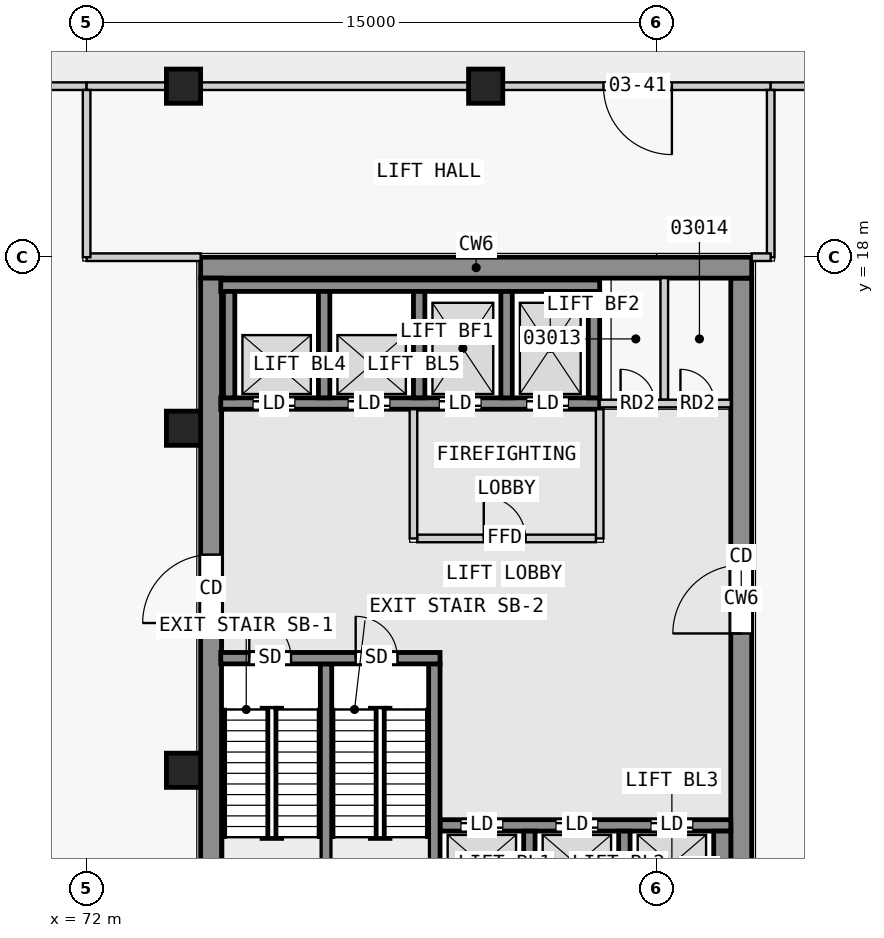
"""IFC4 building model, lengths in metres.
Left out: names, types, materials, properties, quantities, classifications, styles, units other than length and angle.
Written with IfcOpenShell. Run it as: python <this file> out.ifc"""

import sys

from ifc_helpers import new_model, si_unit, direction, frame, frame_2d, origin, origin_2d, place, context, subcontext, project, spatial, rectangle, extrude, element, fill, save


model = new_model("IFC4")
c1 = context("Model", 3, precision=1e-05, world=origin(), true_north=direction((0.0, 1.0)))
c2 = subcontext(c1, "Body", "Model", "MODEL_VIEW")
j1 = project(units=[si_unit("LENGTHUNIT", "METRE"), si_unit("PLANEANGLEUNIT", "RADIAN")], contexts=[c1])
p1 = place(None, origin())
s1 = spatial("IfcSite", under=j1, at=p1, CompositionType="ELEMENT")
p2 = place(p1, origin())
s2 = spatial("IfcBuilding", under=s1, at=p2, CompositionType="ELEMENT")
p3 = place(p2, frame((0.0, 0.0, 17.3)))
s3 = spatial("IfcBuildingStorey", under=s2, at=p3, CompositionType="ELEMENT", Elevation=17.3)
for number, where, z_axis, x_axis in (
    (1, (82.5, 22.5, 0.0), (0.0, 0.0, 1.0), (1.0, 0.0, 0.0)),
    (2, (74.55, 22.5, 0.0), (0.0, 0.0, 1.0), (1.0, 0.0, 0.0)),
    (3, (74.55, 13.5, 0.0), (0.0, 0.0, 1.0), (1.0, 0.0, 0.0)),
    (4, (74.55, 4.5, 0.0), (0.0, 0.0, 1.0), (1.0, 0.0, 0.0)),
):
    element("IfcColumn", number, at=place(p3, frame(where, z_axis=z_axis, x_axis=x_axis)), inside=s3, PredefinedType="COLUMN", context=c2, shape_type="SweptSolid", body=[
        extrude(rectangle(XDim=0.9, YDim=0.9, at=origin_2d()), origin(), (0.0, 0.0, 1.0), 4.5),
    ])
p4 = place(p3, frame((75.0, 17.725, 0.0), z_axis=(0.0, 0.0, 1.0), x_axis=(1.0, 0.0, 0.0)))
e5 = element("IfcWall", 5, at=p4, inside=s3, PredefinedType="SHEAR", context=c2, shape_type="SweptSolid", body=[
    extrude(rectangle(XDim=14.5, YDim=0.55, at=frame_2d((7.25, 0.0))), origin(), (0.0, 0.0, 1.0), 4.15),
])
p5 = place(p3, frame((75.275, 0.55, 0.0), z_axis=(0.0, 0.0, 1.0), x_axis=(0.0, 1.0, 0.0)))
e6 = element("IfcWall", 6, at=p5, inside=s3, PredefinedType="SHEAR", context=c2, shape_type="SweptSolid", body=[
    extrude(rectangle(XDim=16.9, YDim=0.55, at=frame_2d((8.45, 0.0))), origin(), (0.0, 0.0, 1.0), 4.15),
])
p6 = place(p5, frame((7.825, 0.0, 0.0)))
e7 = element("IfcOpeningElement", 7, at=p6, cuts=e6, PredefinedType="OPENING", context=c2, shape_type="SweptSolid", body=[
    extrude(rectangle(XDim=1.8, YDim=2.1, at=frame_2d((0.9, 1.05))), frame((0.0, 0.285, 0.0), z_axis=(0.0, -1.0, 0.0), x_axis=(1.0, 0.0, 0.0)), (0.0, 0.0, 1.0), 0.57),
])
p7 = place(p3, frame((89.225, 0.55, 0.0), z_axis=(0.0, 0.0, 1.0), x_axis=(0.0, 1.0, 0.0)))
e8 = element("IfcWall", 8, at=p7, inside=s3, PredefinedType="SHEAR", context=c2, shape_type="SweptSolid", body=[
    extrude(rectangle(XDim=16.9, YDim=0.55, at=frame_2d((8.45, 0.0))), origin(), (0.0, 0.0, 1.0), 4.15),
])
p8 = place(p7, frame((7.55, 0.0, 0.0)))
e9 = element("IfcOpeningElement", 9, at=p8, cuts=e8, PredefinedType="OPENING", context=c2, shape_type="SweptSolid", body=[
    extrude(rectangle(XDim=1.8, YDim=2.1, at=frame_2d((0.9, 1.05))), frame((0.0, 0.285, 0.0), z_axis=(0.0, -1.0, 0.0), x_axis=(1.0, 0.0, 0.0)), (0.0, 0.0, 1.0), 0.57),
])
p9 = place(p3, frame((75.53, 7.45, 0.0), z_axis=(0.0, 0.0, 1.0), x_axis=(1.0, 0.0, 0.0)))
e10 = element("IfcWall", 10, at=p9, inside=s3, PredefinedType="SHEAR", context=c2, shape_type="SweptSolid", body=[
    extrude(rectangle(XDim=5.77, YDim=0.3, at=frame_2d((2.885, 0.0))), origin(), (0.0, 0.0, 1.0), 4.15),
])
p10 = place(p9, frame((0.75, 0.0, 0.0)))
e11 = element("IfcOpeningElement", 11, at=p10, cuts=e10, PredefinedType="OPENING", context=c2, shape_type="SweptSolid", body=[
    extrude(rectangle(XDim=1.1, YDim=2.1, at=frame_2d((0.55, 1.05))), frame((0.0, 0.16, 0.0), z_axis=(0.0, -1.0, 0.0), x_axis=(1.0, 0.0, 0.0)), (0.0, 0.0, 1.0), 0.32),
])
p11 = place(p9, frame((3.55, 0.0, 0.0)))
e12 = element("IfcOpeningElement", 12, at=p11, cuts=e10, PredefinedType="OPENING", context=c2, shape_type="SweptSolid", body=[
    extrude(rectangle(XDim=1.1, YDim=2.1, at=frame_2d((0.55, 1.05))), frame((0.0, 0.16, 0.0), z_axis=(0.0, -1.0, 0.0), x_axis=(1.0, 0.0, 0.0)), (0.0, 0.0, 1.0), 0.32),
])
for number, where, z_axis, x_axis in (
    (13, (78.3, 0.9, 0.0), (0.0, 0.0, 1.0), (0.0, 1.0, 0.0)),
    (14, (81.15, 0.9, 0.0), (0.0, 0.0, 1.0), (0.0, 1.0, 0.0)),
):
    element("IfcWall", number, at=place(p3, frame(where, z_axis=z_axis, x_axis=x_axis)), inside=s3, PredefinedType="SHEAR", context=c2, shape_type="SweptSolid", body=[
        extrude(rectangle(XDim=6.4, YDim=0.3, at=frame_2d((3.2, 0.0))), origin(), (0.0, 0.0, 1.0), 4.15),
    ])
for number, where, z_axis, x_axis in (
    (15, (83.65, 0.9, 0.0), (0.0, 0.0, 1.0), (0.0, 1.0, 0.0)),
    (16, (86.15, 0.9, 0.0), (0.0, 0.0, 1.0), (0.0, 1.0, 0.0)),
):
    element("IfcWall", number, at=place(p3, frame(where, z_axis=z_axis, x_axis=x_axis)), inside=s3, PredefinedType="SHEAR", context=c2, shape_type="SweptSolid", body=[
        extrude(rectangle(XDim=2.0, YDim=0.3, at=frame_2d((1.0, 0.0))), origin(), (0.0, 0.0, 1.0), 4.15),
    ])
p12 = place(p3, frame((88.725, 0.9, 0.0), z_axis=(0.0, 0.0, 1.0), x_axis=(0.0, 1.0, 0.0)))
e17 = element("IfcWall", 17, at=p12, inside=s3, PredefinedType="SHEAR", context=c2, shape_type="SweptSolid", body=[
    extrude(rectangle(XDim=2.0, YDim=0.45, at=frame_2d((1.0, 0.0))), origin(), (0.0, 0.0, 1.0), 4.15),
])
p13 = place(p3, frame((81.3, 3.05, 0.0), z_axis=(0.0, 0.0, 1.0), x_axis=(1.0, 0.0, 0.0)))
e18 = element("IfcWall", 18, at=p13, inside=s3, PredefinedType="SHEAR", context=c2, shape_type="SweptSolid", body=[
    extrude(rectangle(XDim=7.65, YDim=0.3, at=frame_2d((3.825, 0.0))), origin(), (0.0, 0.0, 1.0), 4.15),
])
p14 = place(p13, frame((0.55, 0.0, 0.0)))
e19 = element("IfcOpeningElement", 19, at=p14, cuts=e18, PredefinedType="OPENING", context=c2, shape_type="SweptSolid", body=[
    extrude(rectangle(XDim=1.1, YDim=2.1, at=frame_2d((0.55, 1.05))), frame((0.0, 0.16, 0.0), z_axis=(0.0, -1.0, 0.0), x_axis=(1.0, 0.0, 0.0)), (0.0, 0.0, 1.0), 0.32),
])
p15 = place(p13, frame((3.05, 0.0, 0.0)))
e20 = element("IfcOpeningElement", 20, at=p15, cuts=e18, PredefinedType="OPENING", context=c2, shape_type="SweptSolid", body=[
    extrude(rectangle(XDim=1.1, YDim=2.1, at=frame_2d((0.55, 1.05))), frame((0.0, 0.16, 0.0), z_axis=(0.0, -1.0, 0.0), x_axis=(1.0, 0.0, 0.0)), (0.0, 0.0, 1.0), 0.32),
])
p16 = place(p13, frame((5.55, 0.0, 0.0)))
e21 = element("IfcOpeningElement", 21, at=p16, cuts=e18, PredefinedType="OPENING", context=c2, shape_type="SweptSolid", body=[
    extrude(rectangle(XDim=1.1, YDim=2.1, at=frame_2d((0.55, 1.05))), frame((0.0, 0.16, 0.0), z_axis=(0.0, -1.0, 0.0), x_axis=(1.0, 0.0, 0.0)), (0.0, 0.0, 1.0), 0.32),
])
p17 = place(p3, frame((75.53, 17.25, 0.0), z_axis=(0.0, 0.0, 1.0), x_axis=(1.0, 0.0, 0.0)))
e22 = element("IfcWall", 22, at=p17, inside=s3, PredefinedType="SHEAR", context=c2, shape_type="SweptSolid", body=[
    extrude(rectangle(XDim=9.97, YDim=0.3, at=frame_2d((4.985, 0.0))), origin(), (0.0, 0.0, 1.0), 4.15),
])
p18 = place(p3, frame((75.53, 14.15, 0.0), z_axis=(0.0, 0.0, 1.0), x_axis=(1.0, 0.0, 0.0)))
e23 = element("IfcWall", 23, at=p18, inside=s3, PredefinedType="SHEAR", context=c2, shape_type="SweptSolid", body=[
    extrude(rectangle(XDim=9.97, YDim=0.3, at=frame_2d((4.985, 0.0))), origin(), (0.0, 0.0, 1.0), 4.15),
])
p19 = place(p18, frame((0.85, 0.0, 0.0)))
e24 = element("IfcOpeningElement", 24, at=p19, cuts=e23, PredefinedType="OPENING", context=c2, shape_type="SweptSolid", body=[
    extrude(rectangle(XDim=1.1, YDim=2.1, at=frame_2d((0.55, 1.05))), frame((0.0, 0.16, 0.0), z_axis=(0.0, -1.0, 0.0), x_axis=(1.0, 0.0, 0.0)), (0.0, 0.0, 1.0), 0.32),
])
p20 = place(p18, frame((3.35, 0.0, 0.0)))
e25 = element("IfcOpeningElement", 25, at=p20, cuts=e23, PredefinedType="OPENING", context=c2, shape_type="SweptSolid", body=[
    extrude(rectangle(XDim=1.1, YDim=2.1, at=frame_2d((0.55, 1.05))), frame((0.0, 0.16, 0.0), z_axis=(0.0, -1.0, 0.0), x_axis=(1.0, 0.0, 0.0)), (0.0, 0.0, 1.0), 0.32),
])
p21 = place(p18, frame((5.75, 0.0, 0.0)))
e26 = element("IfcOpeningElement", 26, at=p21, cuts=e23, PredefinedType="OPENING", context=c2, shape_type="SweptSolid", body=[
    extrude(rectangle(XDim=1.1, YDim=2.1, at=frame_2d((0.55, 1.05))), frame((0.0, 0.16, 0.0), z_axis=(0.0, -1.0, 0.0), x_axis=(1.0, 0.0, 0.0)), (0.0, 0.0, 1.0), 0.32),
])
p22 = place(p18, frame((8.05, 0.0, 0.0)))
e27 = element("IfcOpeningElement", 27, at=p22, cuts=e23, PredefinedType="OPENING", context=c2, shape_type="SweptSolid", body=[
    extrude(rectangle(XDim=1.1, YDim=2.1, at=frame_2d((0.55, 1.05))), frame((0.0, 0.16, 0.0), z_axis=(0.0, -1.0, 0.0), x_axis=(1.0, 0.0, 0.0)), (0.0, 0.0, 1.0), 0.32),
])
for number, where, z_axis, x_axis in (
    (28, (75.75, 14.3, 0.0), (0.0, 0.0, 1.0), (0.0, 1.0, 0.0)),
    (29, (78.25, 14.3, 0.0), (0.0, 0.0, 1.0), (0.0, 1.0, 0.0)),
    (30, (80.75, 14.3, 0.0), (0.0, 0.0, 1.0), (0.0, 1.0, 0.0)),
    (31, (83.05, 14.3, 0.0), (0.0, 0.0, 1.0), (0.0, 1.0, 0.0)),
    (32, (85.35, 14.3, 0.0), (0.0, 0.0, 1.0), (0.0, 1.0, 0.0)),
):
    element("IfcWall", number, at=place(p3, frame(where, z_axis=z_axis, x_axis=x_axis)), inside=s3, PredefinedType="SHEAR", context=c2, shape_type="SweptSolid", body=[
        extrude(rectangle(XDim=2.8, YDim=0.3, at=frame_2d((1.4, 0.0))), origin(), (0.0, 0.0, 1.0), 4.15),
    ])
p23 = place(p3, frame((80.6, 10.6, 0.0), z_axis=(0.0, 0.0, 1.0), x_axis=(0.0, 1.0, 0.0)))
e33 = element("IfcWall", 33, at=p23, inside=s3, PredefinedType="PARTITIONING", context=c2, shape_type="SweptSolid", body=[
    extrude(rectangle(XDim=3.4, YDim=0.2, at=frame_2d((1.7, 0.0))), origin(), (0.0, 0.0, 1.0), 4.15),
])
p24 = place(p3, frame((80.7, 10.6, 0.0), z_axis=(0.0, 0.0, 1.0), x_axis=(1.0, 0.0, 0.0)))
e34 = element("IfcWall", 34, at=p24, inside=s3, PredefinedType="PARTITIONING", context=c2, shape_type="SweptSolid", body=[
    extrude(rectangle(XDim=4.7, YDim=0.2, at=frame_2d((2.35, 0.0))), origin(), (0.0, 0.0, 1.0), 4.15),
])
p25 = place(p24, frame((1.75, 0.0, 0.0)))
e35 = element("IfcOpeningElement", 35, at=p25, cuts=e34, PredefinedType="OPENING", context=c2, shape_type="SweptSolid", body=[
    extrude(rectangle(XDim=1.1, YDim=2.1, at=frame_2d((0.55, 1.05))), frame((0.0, 0.11, 0.0), z_axis=(0.0, -1.0, 0.0), x_axis=(1.0, 0.0, 0.0)), (0.0, 0.0, 1.0), 0.22),
])
p26 = place(p3, frame((85.5, 10.6, 0.0), z_axis=(0.0, 0.0, 1.0), x_axis=(0.0, 1.0, 0.0)))
e36 = element("IfcWall", 36, at=p26, inside=s3, PredefinedType="PARTITIONING", context=c2, shape_type="SweptSolid", body=[
    extrude(rectangle(XDim=3.4, YDim=0.2, at=frame_2d((1.7, 0.0))), origin(), (0.0, 0.0, 1.0), 4.15),
])
p27 = place(p3, frame((85.5, 14.15, 0.0), z_axis=(0.0, 0.0, 1.0), x_axis=(1.0, 0.0, 0.0)))
e37 = element("IfcWall", 37, at=p27, inside=s3, PredefinedType="PARTITIONING", context=c2, shape_type="SweptSolid", body=[
    extrude(rectangle(XDim=3.45, YDim=0.2, at=frame_2d((1.725, 0.0))), origin(), (0.0, 0.0, 1.0), 4.15),
])
p28 = place(p27, frame((0.55, 0.0, 0.0)))
e38 = element("IfcOpeningElement", 38, at=p28, cuts=e37, PredefinedType="OPENING", context=c2, shape_type="SweptSolid", body=[
    extrude(rectangle(XDim=0.9, YDim=2.1, at=frame_2d((0.45, 1.05))), frame((0.0, 0.11, 0.0), z_axis=(0.0, -1.0, 0.0), x_axis=(1.0, 0.0, 0.0)), (0.0, 0.0, 1.0), 0.22),
])
p29 = place(p27, frame((2.125, 0.0, 0.0)))
e39 = element("IfcOpeningElement", 39, at=p29, cuts=e37, PredefinedType="OPENING", context=c2, shape_type="SweptSolid", body=[
    extrude(rectangle(XDim=0.9, YDim=2.1, at=frame_2d((0.45, 1.05))), frame((0.0, 0.11, 0.0), z_axis=(0.0, -1.0, 0.0), x_axis=(1.0, 0.0, 0.0)), (0.0, 0.0, 1.0), 0.22),
])
p30 = place(p3, frame((87.2, 14.25, 0.0), z_axis=(0.0, 0.0, 1.0), x_axis=(0.0, 1.0, 0.0)))
e40 = element("IfcWall", 40, at=p30, inside=s3, PredefinedType="PARTITIONING", context=c2, shape_type="SweptSolid", body=[
    extrude(rectangle(XDim=3.2, YDim=0.2, at=frame_2d((1.6, 0.0))), origin(), (0.0, 0.0, 1.0), 4.15),
])
p31 = place(p3, frame((72.0, 22.5, 0.0), z_axis=(0.0, 0.0, 1.0), x_axis=(-1.0, 0.0, 0.0)))
e41 = element("IfcWall", 41, at=p31, inside=s3, PredefinedType="PARTITIONING", context=c2, shape_type="SweptSolid", body=[
    extrude(rectangle(XDim=27.0, YDim=0.2, at=frame_2d((13.5, 0.0))), origin(), (0.0, 0.0, 1.0), 4.15),
])
p32 = place(p31, frame((12.6, 0.0, 0.0)))
e42 = element("IfcOpeningElement", 42, at=p32, cuts=e41, PredefinedType="OPENING", context=c2, shape_type="SweptSolid", body=[
    extrude(rectangle(XDim=1.8, YDim=2.1, at=frame_2d((0.9, 1.05))), frame((0.0, 0.11, 0.0), z_axis=(0.0, -1.0, 0.0), x_axis=(1.0, 0.0, 0.0)), (0.0, 0.0, 1.0), 0.22),
])
p33 = place(p3, frame((90.0, 22.5, 0.0), z_axis=(0.0, 0.0, 1.0), x_axis=(-1.0, 0.0, 0.0)))
e43 = element("IfcWall", 43, at=p33, inside=s3, PredefinedType="PARTITIONING", context=c2, shape_type="SweptSolid", body=[
    extrude(rectangle(XDim=7.05, YDim=0.2, at=frame_2d((3.525, 0.0))), origin(), (0.0, 0.0, 1.0), 4.15),
])
p34 = place(p33, frame((2.6, 0.0, 0.0)))
e44 = element("IfcOpeningElement", 44, at=p34, cuts=e43, PredefinedType="OPENING", context=c2, shape_type="SweptSolid", body=[
    extrude(rectangle(XDim=1.8, YDim=2.1, at=frame_2d((0.9, 1.05))), frame((0.0, 0.11, 0.0), z_axis=(0.0, -1.0, 0.0), x_axis=(1.0, 0.0, 0.0)), (0.0, 0.0, 1.0), 0.22),
])
p35 = place(p3, frame((82.05, 22.5, 0.0), z_axis=(0.0, 0.0, 1.0), x_axis=(-1.0, 0.0, 0.0)))
e45 = element("IfcWall", 45, at=p35, inside=s3, PredefinedType="PARTITIONING", context=c2, shape_type="SweptSolid", body=[
    extrude(rectangle(XDim=7.05, YDim=0.2, at=frame_2d((3.525, 0.0))), origin(), (0.0, 0.0, 1.0), 4.15),
])
p36 = place(p3, frame((74.1, 22.5, 0.0), z_axis=(0.0, 0.0, 1.0), x_axis=(-1.0, 0.0, 0.0)))
e46 = element("IfcWall", 46, at=p36, inside=s3, PredefinedType="PARTITIONING", context=c2, shape_type="SweptSolid", body=[
    extrude(rectangle(XDim=2.1, YDim=0.2, at=frame_2d((1.05, 0.0))), origin(), (0.0, 0.0, 1.0), 4.15),
])
p37 = place(p3, frame((91.05, 22.5, 0.0), z_axis=(0.0, 0.0, 1.0), x_axis=(-1.0, 0.0, 0.0)))
e47 = element("IfcWall", 47, at=p37, inside=s3, PredefinedType="PARTITIONING", context=c2, shape_type="SweptSolid", body=[
    extrude(rectangle(XDim=1.05, YDim=0.2, at=frame_2d((0.525, 0.0))), origin(), (0.0, 0.0, 1.0), 4.15),
])
p38 = place(p3, frame((75.0, 18.0, 0.0), z_axis=(0.0, 0.0, 1.0), x_axis=(-1.0, 0.0, 0.0)))
e48 = element("IfcWall", 48, at=p38, inside=s3, PredefinedType="PARTITIONING", context=c2, shape_type="SweptSolid", body=[
    extrude(rectangle(XDim=3.0, YDim=0.2, at=frame_2d((1.5, 0.0))), origin(), (0.0, 0.0, 1.0), 4.15),
])
for number, where, z_axis, x_axis in (
    (49, (72.0, 18.0, 0.0), (0.0, 0.0, 1.0), (0.0, 1.0, 0.0)),
    (50, (90.0, 22.4, 0.0), (0.0, 0.0, 1.0), (0.0, -1.0, 0.0)),
):
    element("IfcWall", number, at=place(p3, frame(where, z_axis=z_axis, x_axis=x_axis)), inside=s3, PredefinedType="PARTITIONING", context=c2, shape_type="SweptSolid", body=[
        extrude(rectangle(XDim=4.4, YDim=0.2, at=frame_2d((2.2, 0.0))), origin(), (0.0, 0.0, 1.0), 4.15),
    ])
p39 = place(p3, frame((90.0, 18.0, 0.0), z_axis=(0.0, 0.0, 1.0), x_axis=(-1.0, 0.0, 0.0)))
e51 = element("IfcWall", 51, at=p39, inside=s3, PredefinedType="PARTITIONING", context=c2, shape_type="SweptSolid", body=[
    extrude(rectangle(XDim=0.5, YDim=0.2, at=frame_2d((0.25, 0.0))), origin(), (0.0, 0.0, 1.0), 4.15),
])
p40 = place(p25, origin())
e52 = element("IfcDoor", 52, at=p40, inside=s3, OperationType="SINGLE_SWING_LEFT", PredefinedType="DOOR", context=c2, shape_type="SweptSolid", body=[
    extrude(rectangle(XDim=1.1, YDim=2.1, at=frame_2d((0.55, 1.05))), frame((0.0, 0.025, 0.0), z_axis=(0.0, -1.0, 0.0), x_axis=(1.0, 0.0, 0.0)), (0.0, 0.0, 1.0), 0.05),
])
fill(e35, e52)
p41 = place(p14, origin())
e53 = element("IfcDoor", 53, at=p41, inside=s3, OperationType="DOUBLE_DOOR_SLIDING", PredefinedType="DOOR", context=c2, shape_type="SweptSolid", body=[
    extrude(rectangle(XDim=1.1, YDim=2.1, at=frame_2d((0.55, 1.05))), frame((0.0, 0.025, 0.0), z_axis=(0.0, -1.0, 0.0), x_axis=(1.0, 0.0, 0.0)), (0.0, 0.0, 1.0), 0.05),
])
fill(e19, e53)
p42 = place(p15, origin())
e54 = element("IfcDoor", 54, at=p42, inside=s3, OperationType="DOUBLE_DOOR_SLIDING", PredefinedType="DOOR", context=c2, shape_type="SweptSolid", body=[
    extrude(rectangle(XDim=1.1, YDim=2.1, at=frame_2d((0.55, 1.05))), frame((0.0, 0.025, 0.0), z_axis=(0.0, -1.0, 0.0), x_axis=(1.0, 0.0, 0.0)), (0.0, 0.0, 1.0), 0.05),
])
fill(e20, e54)
p43 = place(p16, origin())
e55 = element("IfcDoor", 55, at=p43, inside=s3, OperationType="DOUBLE_DOOR_SLIDING", PredefinedType="DOOR", context=c2, shape_type="SweptSolid", body=[
    extrude(rectangle(XDim=1.1, YDim=2.1, at=frame_2d((0.55, 1.05))), frame((0.0, 0.025, 0.0), z_axis=(0.0, -1.0, 0.0), x_axis=(1.0, 0.0, 0.0)), (0.0, 0.0, 1.0), 0.05),
])
fill(e21, e55)
p44 = place(p19, origin())
e56 = element("IfcDoor", 56, at=p44, inside=s3, OperationType="DOUBLE_DOOR_SLIDING", PredefinedType="DOOR", context=c2, shape_type="SweptSolid", body=[
    extrude(rectangle(XDim=1.1, YDim=2.1, at=frame_2d((0.55, 1.05))), frame((0.0, 0.025, 0.0), z_axis=(0.0, -1.0, 0.0), x_axis=(1.0, 0.0, 0.0)), (0.0, 0.0, 1.0), 0.05),
])
fill(e24, e56)
p45 = place(p20, origin())
e57 = element("IfcDoor", 57, at=p45, inside=s3, OperationType="DOUBLE_DOOR_SLIDING", PredefinedType="DOOR", context=c2, shape_type="SweptSolid", body=[
    extrude(rectangle(XDim=1.1, YDim=2.1, at=frame_2d((0.55, 1.05))), frame((0.0, 0.025, 0.0), z_axis=(0.0, -1.0, 0.0), x_axis=(1.0, 0.0, 0.0)), (0.0, 0.0, 1.0), 0.05),
])
fill(e25, e57)
p46 = place(p21, origin())
e58 = element("IfcDoor", 58, at=p46, inside=s3, OperationType="DOUBLE_DOOR_SLIDING", PredefinedType="DOOR", context=c2, shape_type="SweptSolid", body=[
    extrude(rectangle(XDim=1.1, YDim=2.1, at=frame_2d((0.55, 1.05))), frame((0.0, 0.025, 0.0), z_axis=(0.0, -1.0, 0.0), x_axis=(1.0, 0.0, 0.0)), (0.0, 0.0, 1.0), 0.05),
])
fill(e26, e58)
p47 = place(p22, origin())
e59 = element("IfcDoor", 59, at=p47, inside=s3, OperationType="DOUBLE_DOOR_SLIDING", PredefinedType="DOOR", context=c2, shape_type="SweptSolid", body=[
    extrude(rectangle(XDim=1.1, YDim=2.1, at=frame_2d((0.55, 1.05))), frame((0.0, 0.025, 0.0), z_axis=(0.0, -1.0, 0.0), x_axis=(1.0, 0.0, 0.0)), (0.0, 0.0, 1.0), 0.05),
])
fill(e27, e59)
p48 = place(p10, origin())
e60 = element("IfcDoor", 60, at=p48, inside=s3, OperationType="SINGLE_SWING_RIGHT", PredefinedType="DOOR", context=c2, shape_type="SweptSolid", body=[
    extrude(rectangle(XDim=1.1, YDim=2.1, at=frame_2d((0.55, 1.05))), frame((0.0, 0.025, 0.0), z_axis=(0.0, -1.0, 0.0), x_axis=(1.0, 0.0, 0.0)), (0.0, 0.0, 1.0), 0.05),
])
fill(e11, e60)
p49 = place(p11, origin())
e61 = element("IfcDoor", 61, at=p49, inside=s3, OperationType="SINGLE_SWING_LEFT", PredefinedType="DOOR", context=c2, shape_type="SweptSolid", body=[
    extrude(rectangle(XDim=1.1, YDim=2.1, at=frame_2d((0.55, 1.05))), frame((0.0, 0.025, 0.0), z_axis=(0.0, -1.0, 0.0), x_axis=(1.0, 0.0, 0.0)), (0.0, 0.0, 1.0), 0.05),
])
fill(e12, e61)
p50 = place(p6, origin())
e62 = element("IfcDoor", 62, at=p50, inside=s3, OperationType="DOUBLE_DOOR_SINGLE_SWING", PredefinedType="DOOR", context=c2, shape_type="SweptSolid", body=[
    extrude(rectangle(XDim=1.8, YDim=2.1, at=frame_2d((0.9, 1.05))), frame((0.0, 0.025, 0.0), z_axis=(0.0, -1.0, 0.0), x_axis=(1.0, 0.0, 0.0)), (0.0, 0.0, 1.0), 0.05),
])
fill(e7, e62)
p51 = place(p8, origin())
e63 = element("IfcDoor", 63, at=p51, inside=s3, OperationType="DOUBLE_DOOR_SINGLE_SWING", PredefinedType="DOOR", context=c2, shape_type="SweptSolid", body=[
    extrude(rectangle(XDim=1.8, YDim=2.1, at=frame_2d((0.9, 1.05))), frame((0.0, 0.025, 0.0), z_axis=(0.0, -1.0, 0.0), x_axis=(1.0, 0.0, 0.0)), (0.0, 0.0, 1.0), 0.05),
])
fill(e9, e63)
p52 = place(p28, origin())
e64 = element("IfcDoor", 64, at=p52, inside=s3, OperationType="SINGLE_SWING_LEFT", PredefinedType="DOOR", context=c2, shape_type="SweptSolid", body=[
    extrude(rectangle(XDim=0.9, YDim=2.1, at=frame_2d((0.45, 1.05))), frame((0.0, 0.025, 0.0), z_axis=(0.0, -1.0, 0.0), x_axis=(1.0, 0.0, 0.0)), (0.0, 0.0, 1.0), 0.05),
])
fill(e38, e64)
p53 = place(p29, origin())
e65 = element("IfcDoor", 65, at=p53, inside=s3, OperationType="SINGLE_SWING_LEFT", PredefinedType="DOOR", context=c2, shape_type="SweptSolid", body=[
    extrude(rectangle(XDim=0.9, YDim=2.1, at=frame_2d((0.45, 1.05))), frame((0.0, 0.025, 0.0), z_axis=(0.0, -1.0, 0.0), x_axis=(1.0, 0.0, 0.0)), (0.0, 0.0, 1.0), 0.05),
])
fill(e39, e65)
p54 = place(p34, origin())
e66 = element("IfcDoor", 66, at=p54, inside=s3, OperationType="DOUBLE_DOOR_SINGLE_SWING", PredefinedType="DOOR", context=c2, shape_type="SweptSolid", body=[
    extrude(rectangle(XDim=1.8, YDim=2.1, at=frame_2d((0.9, 1.05))), frame((0.0, 0.025, 0.0), z_axis=(0.0, -1.0, 0.0), x_axis=(1.0, 0.0, 0.0)), (0.0, 0.0, 1.0), 0.05),
])
fill(e44, e66)
save(model, sys.argv[1])
